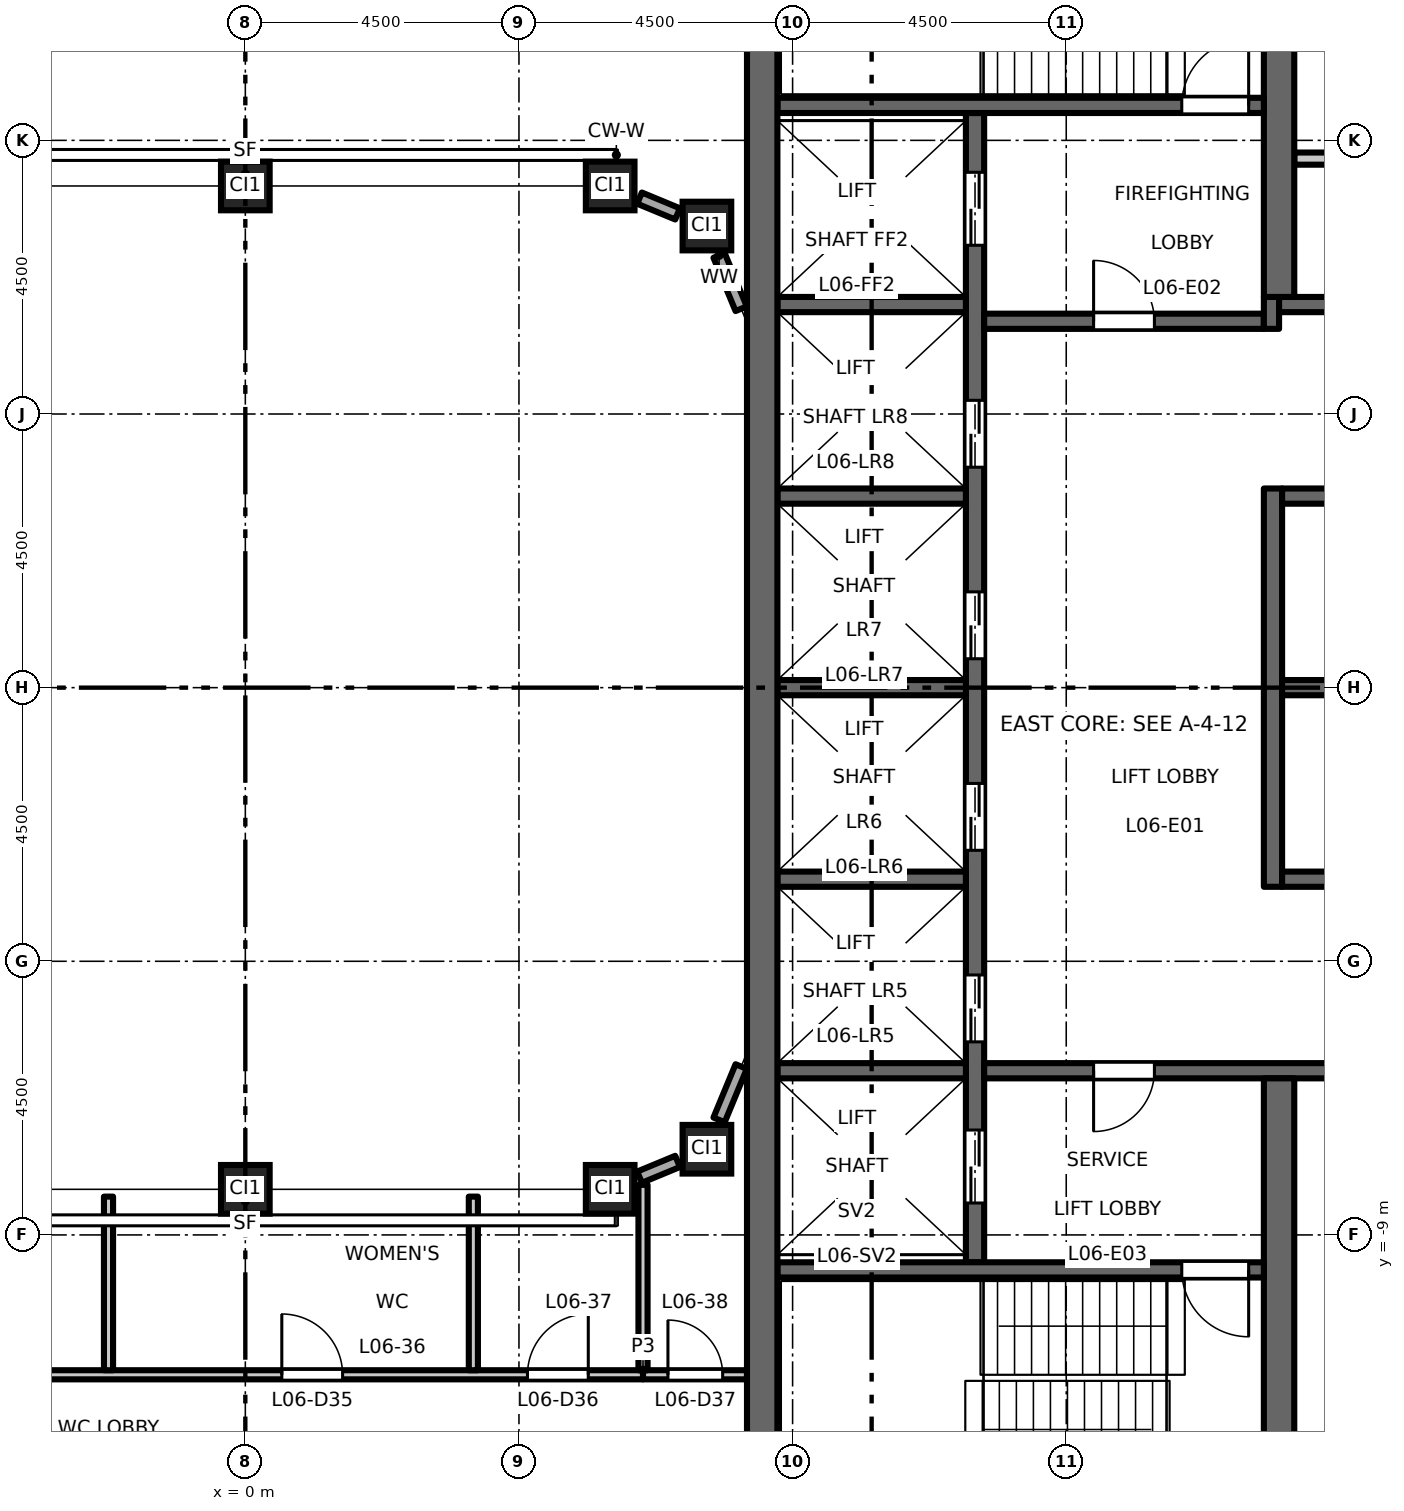
"""IFC4 building model, lengths in metres.
Left out: names, types, materials, properties, quantities, classifications, styles, units other than length and angle.
Written with IfcOpenShell. Run it as: python <this file> out.ifc"""

import sys

from ifc_helpers import new_model, si_unit, direction, frame, frame_2d, origin, origin_2d, place, context, subcontext, project, spatial, rectangle, hollow_rectangle, extrude, element, fill, save


model = new_model("IFC4")
c1 = context("Model", 3, precision=1e-05, world=origin(), true_north=direction((0.0, 1.0)))
c2 = subcontext(c1, "Body", "Model", "MODEL_VIEW")
j1 = project(units=[si_unit("LENGTHUNIT", "METRE"), si_unit("PLANEANGLEUNIT", "RADIAN")], contexts=[c1])
p1 = place(None, origin())
s1 = spatial("IfcSite", under=j1, at=p1, CompositionType="ELEMENT")
p2 = place(p1, origin())
s2 = spatial("IfcBuilding", under=s1, at=p2, CompositionType="ELEMENT")
p3 = place(p2, frame((0.0, 0.0, 31.2)))
s3 = spatial("IfcBuildingStorey", under=s2, at=p3, CompositionType="ELEMENT", Elevation=31.2)
for number, where, z_axis, x_axis in (
    (1, (0.0, -8.25, 0.0), (0.0, 0.0, 1.0), (1.0, 0.0, 0.0)),
    (2, (6.0, -8.25, 0.0), (0.0, 0.0, 1.0), (1.0, 0.0, 0.0)),
    (3, (7.591, -7.591, 0.0), (0.0, 0.0, 1.0), (1.0, 0.0, 0.0)),
    (4, (0.0, 8.25, 0.0), (0.0, 0.0, 1.0), (1.0, 0.0, 0.0)),
    (5, (6.0, 8.25, 0.0), (0.0, 0.0, 1.0), (1.0, 0.0, 0.0)),
    (6, (7.591, 7.591, 0.0), (0.0, 0.0, 1.0), (1.0, 0.0, 0.0)),
):
    element("IfcColumn", number, at=place(p3, frame(where, z_axis=z_axis, x_axis=x_axis)), inside=s3, PredefinedType="COLUMN", context=c2, shape_type="SweptSolid", body=[
        extrude(hollow_rectangle(XDim=0.8, YDim=0.8, WallThickness=0.05, at=origin_2d()), origin(), (0.0, 0.0, 1.0), 4.5),
    ])
p4 = place(p3, frame((12.0, -9.45, 0.0), z_axis=(0.0, 0.0, 1.0), x_axis=(0.0, 1.0, 0.0)))
e7 = element("IfcWall", 7, at=p4, inside=s3, PredefinedType="SHEAR", context=c2, shape_type="SweptSolid", body=[
    extrude(rectangle(XDim=18.9, YDim=0.3, at=frame_2d((9.45, 0.0))), origin(), (0.0, 0.0, 1.0), 4.35),
])
p5 = place(p4, frame((3.625, 0.0, 0.0)))
e8 = element("IfcOpeningElement", 8, at=p5, cuts=e7, PredefinedType="OPENING", context=c2, shape_type="SweptSolid", body=[
    extrude(rectangle(XDim=1.1, YDim=2.1, at=frame_2d((0.55, 1.05))), frame((0.0, 0.16, 0.0), z_axis=(0.0, -1.0, 0.0), x_axis=(1.0, 0.0, 0.0)), (0.0, 0.0, 1.0), 0.32),
])
p6 = place(p4, frame((6.775, 0.0, 0.0)))
e9 = element("IfcOpeningElement", 9, at=p6, cuts=e7, PredefinedType="OPENING", context=c2, shape_type="SweptSolid", body=[
    extrude(rectangle(XDim=1.1, YDim=2.1, at=frame_2d((0.55, 1.05))), frame((0.0, 0.16, 0.0), z_axis=(0.0, -1.0, 0.0), x_axis=(1.0, 0.0, 0.0)), (0.0, 0.0, 1.0), 0.32),
])
p7 = place(p4, frame((9.925, 0.0, 0.0)))
e10 = element("IfcOpeningElement", 10, at=p7, cuts=e7, PredefinedType="OPENING", context=c2, shape_type="SweptSolid", body=[
    extrude(rectangle(XDim=1.1, YDim=2.1, at=frame_2d((0.55, 1.05))), frame((0.0, 0.16, 0.0), z_axis=(0.0, -1.0, 0.0), x_axis=(1.0, 0.0, 0.0)), (0.0, 0.0, 1.0), 0.32),
])
p8 = place(p4, frame((13.075, 0.0, 0.0)))
e11 = element("IfcOpeningElement", 11, at=p8, cuts=e7, PredefinedType="OPENING", context=c2, shape_type="SweptSolid", body=[
    extrude(rectangle(XDim=1.1, YDim=2.1, at=frame_2d((0.55, 1.05))), frame((0.0, 0.16, 0.0), z_axis=(0.0, -1.0, 0.0), x_axis=(1.0, 0.0, 0.0)), (0.0, 0.0, 1.0), 0.32),
])
p9 = place(p4, frame((16.725, 0.0, 0.0)))
e12 = element("IfcOpeningElement", 12, at=p9, cuts=e7, PredefinedType="OPENING", context=c2, shape_type="SweptSolid", body=[
    extrude(rectangle(XDim=1.2, YDim=2.1, at=frame_2d((0.6, 1.05))), frame((0.0, 0.16, 0.0), z_axis=(0.0, -1.0, 0.0), x_axis=(1.0, 0.0, 0.0)), (0.0, 0.0, 1.0), 0.32),
])
p10 = place(p4, frame((0.975, 0.0, 0.0)))
e13 = element("IfcOpeningElement", 13, at=p10, cuts=e7, PredefinedType="OPENING", context=c2, shape_type="SweptSolid", body=[
    extrude(rectangle(XDim=1.2, YDim=2.1, at=frame_2d((0.6, 1.05))), frame((0.0, 0.16, 0.0), z_axis=(0.0, -1.0, 0.0), x_axis=(1.0, 0.0, 0.0)), (0.0, 0.0, 1.0), 0.32),
])
p11 = place(p3, frame((12.15, 6.025, 0.0), z_axis=(0.0, 0.0, 1.0), x_axis=(1.0, 0.0, 0.0)))
e14 = element("IfcWall", 14, at=p11, inside=s3, PredefinedType="SHEAR", context=c2, shape_type="SweptSolid", body=[
    extrude(rectangle(XDim=4.6, YDim=0.25, at=frame_2d((2.3, 0.0))), origin(), (0.0, 0.0, 1.0), 4.35),
])
p12 = place(p11, frame((1.8, 0.0, 0.0)))
e15 = element("IfcOpeningElement", 15, at=p12, cuts=e14, PredefinedType="OPENING", context=c2, shape_type="SweptSolid", body=[
    extrude(rectangle(XDim=1.0, YDim=2.1, at=frame_2d((0.5, 1.05))), frame((0.0, 0.135, 0.0), z_axis=(0.0, -1.0, 0.0), x_axis=(1.0, 0.0, 0.0)), (0.0, 0.0, 1.0), 0.27),
])
p13 = place(p3, frame((16.875, 5.9, 0.0), z_axis=(0.0, 0.0, 1.0), x_axis=(0.0, 1.0, 0.0)))
e16 = element("IfcWall", 16, at=p13, inside=s3, PredefinedType="SHEAR", context=c2, shape_type="SweptSolid", body=[
    extrude(rectangle(XDim=0.525, YDim=0.25, at=frame_2d((0.263, 0.0))), origin(), (0.0, 0.0, 1.0), 4.35),
])
p14 = place(p3, frame((17.0, 6.3, 0.0), z_axis=(0.0, 0.0, 1.0), x_axis=(1.0, 0.0, 0.0)))
e17 = element("IfcWall", 17, at=p14, inside=s3, PredefinedType="SHEAR", context=c2, shape_type="SweptSolid", body=[
    extrude(rectangle(XDim=4.25, YDim=0.25, at=frame_2d((2.125, 0.0))), origin(), (0.0, 0.0, 1.0), 4.35),
])
p15 = place(p14, frame((1.3, 0.0, 0.0)))
e18 = element("IfcOpeningElement", 18, at=p15, cuts=e17, PredefinedType="OPENING", context=c2, shape_type="SweptSolid", body=[
    extrude(rectangle(XDim=0.9, YDim=2.1, at=frame_2d((0.45, 1.05))), frame((0.0, 0.135, 0.0), z_axis=(0.0, -1.0, 0.0), x_axis=(1.0, 0.0, 0.0)), (0.0, 0.0, 1.0), 0.27),
])
p16 = place(p3, frame((12.15, -6.3, 0.0), z_axis=(0.0, 0.0, 1.0), x_axis=(1.0, 0.0, 0.0)))
e19 = element("IfcWall", 19, at=p16, inside=s3, PredefinedType="SHEAR", context=c2, shape_type="SweptSolid", body=[
    extrude(rectangle(XDim=9.1, YDim=0.25, at=frame_2d((4.55, 0.0))), origin(), (0.0, 0.0, 1.0), 4.35),
])
p17 = place(p16, frame((1.8, 0.0, 0.0)))
e20 = element("IfcOpeningElement", 20, at=p17, cuts=e19, PredefinedType="OPENING", context=c2, shape_type="SweptSolid", body=[
    extrude(rectangle(XDim=1.0, YDim=2.1, at=frame_2d((0.5, 1.05))), frame((0.0, 0.135, 0.0), z_axis=(0.0, -1.0, 0.0), x_axis=(1.0, 0.0, 0.0)), (0.0, 0.0, 1.0), 0.27),
])
p18 = place(p16, frame((6.65, 0.0, 0.0)))
e21 = element("IfcOpeningElement", 21, at=p18, cuts=e19, PredefinedType="OPENING", context=c2, shape_type="SweptSolid", body=[
    extrude(rectangle(XDim=0.9, YDim=2.1, at=frame_2d((0.45, 1.05))), frame((0.0, 0.135, 0.0), z_axis=(0.0, -1.0, 0.0), x_axis=(1.0, 0.0, 0.0)), (0.0, 0.0, 1.0), 0.27),
])
p19 = place(p3, frame((17.25, 8.7, 0.0), z_axis=(0.0, 0.0, 1.0), x_axis=(1.0, 0.0, 0.0)))
e22 = element("IfcWall", 22, at=p19, inside=s3, PredefinedType="PARTITIONING", context=c2, shape_type="SweptSolid", body=[
    extrude(rectangle(XDim=4.0, YDim=0.2, at=frame_2d((2.0, 0.0))), origin(), (0.0, 0.0, 1.0), 4.35),
])
p20 = place(p3, frame((16.9, -3.275, 0.0), z_axis=(0.0, 0.0, 1.0), x_axis=(0.0, 1.0, 0.0)))
e23 = element("IfcWall", 23, at=p20, inside=s3, PredefinedType="SHEAR", context=c2, shape_type="SweptSolid", body=[
    extrude(rectangle(XDim=6.55, YDim=0.3, at=frame_2d((3.275, 0.0))), origin(), (0.0, 0.0, 1.0), 4.35),
])
for number, where, z_axis, x_axis in (
    (24, (17.05, 0.0, 0.0), (0.0, 0.0, 1.0), (1.0, 0.0, 0.0)),
    (25, (17.05, 3.15, 0.0), (0.0, 0.0, 1.0), (1.0, 0.0, 0.0)),
    (26, (17.05, -3.15, 0.0), (0.0, 0.0, 1.0), (1.0, 0.0, 0.0)),
):
    element("IfcWall", number, at=place(p3, frame(where, z_axis=z_axis, x_axis=x_axis)), inside=s3, PredefinedType="SHEAR", context=c2, shape_type="SweptSolid", body=[
        extrude(rectangle(XDim=4.2, YDim=0.25, at=frame_2d((2.1, 0.0))), origin(), (0.0, 0.0, 1.0), 4.35),
    ])
for number, where, z_axis, x_axis in (
    (27, (17.0, 6.425, 0.0), (0.0, 0.0, 1.0), (0.0, 1.0, 0.0)),
    (28, (17.0, -13.0, 0.0), (0.0, 0.0, 1.0), (0.0, 1.0, 0.0)),
):
    element("IfcWall", number, at=place(p3, frame(where, z_axis=z_axis, x_axis=x_axis)), inside=s3, PredefinedType="SHEAR", context=c2, shape_type="SweptSolid", body=[
        extrude(rectangle(XDim=6.575, YDim=0.5, at=frame_2d((3.288, 0.0))), origin(), (0.0, 0.0, 1.0), 4.35),
    ])
for number, where, z_axis, x_axis in (
    (29, (8.75, 0.0, 0.0), (0.0, 0.0, 1.0), (1.0, 0.0, 0.0)),
    (30, (8.75, 3.15, 0.0), (0.0, 0.0, 1.0), (1.0, 0.0, 0.0)),
    (31, (8.75, 6.3, 0.0), (0.0, 0.0, 1.0), (1.0, 0.0, 0.0)),
    (32, (8.75, -3.15, 0.0), (0.0, 0.0, 1.0), (1.0, 0.0, 0.0)),
    (33, (8.75, -6.3, 0.0), (0.0, 0.0, 1.0), (1.0, 0.0, 0.0)),
):
    element("IfcWall", number, at=place(p3, frame(where, z_axis=z_axis, x_axis=x_axis)), inside=s3, PredefinedType="SHEAR", context=c2, shape_type="SweptSolid", body=[
        extrude(rectangle(XDim=3.1, YDim=0.25, at=frame_2d((1.55, 0.0))), origin(), (0.0, 0.0, 1.0), 4.35),
    ])
p21 = place(p3, frame((8.75, 9.575, 0.0), z_axis=(0.0, 0.0, 1.0), x_axis=(1.0, 0.0, 0.0)))
e34 = element("IfcWall", 34, at=p21, inside=s3, PredefinedType="SHEAR", context=c2, shape_type="SweptSolid", body=[
    extrude(rectangle(XDim=8.0, YDim=0.25, at=frame_2d((4.0, 0.0))), origin(), (0.0, 0.0, 1.0), 4.35),
])
p22 = place(p21, frame((6.65, 0.0, 0.0)))
e35 = element("IfcOpeningElement", 35, at=p22, cuts=e34, PredefinedType="OPENING", context=c2, shape_type="SweptSolid", body=[
    extrude(rectangle(XDim=1.1, YDim=2.1, at=frame_2d((0.55, 1.05))), frame((0.0, 0.135, 0.0), z_axis=(0.0, -1.0, 0.0), x_axis=(1.0, 0.0, 0.0)), (0.0, 0.0, 1.0), 0.27),
])
p23 = place(p3, frame((8.75, -9.575, 0.0), z_axis=(0.0, 0.0, 1.0), x_axis=(1.0, 0.0, 0.0)))
e36 = element("IfcWall", 36, at=p23, inside=s3, PredefinedType="SHEAR", context=c2, shape_type="SweptSolid", body=[
    extrude(rectangle(XDim=8.0, YDim=0.25, at=frame_2d((4.0, 0.0))), origin(), (0.0, 0.0, 1.0), 4.35),
])
p24 = place(p23, frame((6.65, 0.0, 0.0)))
e37 = element("IfcOpeningElement", 37, at=p24, cuts=e36, PredefinedType="OPENING", context=c2, shape_type="SweptSolid", body=[
    extrude(rectangle(XDim=1.1, YDim=2.1, at=frame_2d((0.55, 1.05))), frame((0.0, 0.135, 0.0), z_axis=(0.0, -1.0, 0.0), x_axis=(1.0, 0.0, 0.0)), (0.0, 0.0, 1.0), 0.27),
])
p25 = place(p3, frame((8.5, -13.0, 0.0), z_axis=(0.0, 0.0, 1.0), x_axis=(0.0, 1.0, 0.0)))
e38 = element("IfcWall", 38, at=p25, inside=s3, PredefinedType="SHEAR", context=c2, shape_type="SweptSolid", body=[
    extrude(rectangle(XDim=26.0, YDim=0.5, at=frame_2d((13.0, 0.0))), origin(), (0.0, 0.0, 1.0), 4.35),
])
p26 = place(p3, frame((6.483, -8.05, 0.0), z_axis=(0.0, 0.0, 1.0), x_axis=(0.923854141361, 0.382744726273, 0.0)))
e39 = element("IfcWall", 39, at=p26, inside=s3, PredefinedType="STANDARD", context=c2, shape_type="SweptSolid", body=[
    extrude(rectangle(XDim=0.677, YDim=0.2, at=frame_2d((0.338, 0.0))), origin(), (0.0, 0.0, 1.0), 3.73),
])
for number, where, z_axis, x_axis in (
    (40, (7.791, -7.108, 0.0), (0.0, 0.0, 1.0), (0.383, 0.924, 0.0)),
    (41, (8.154, 6.231, 0.0), (0.0, 0.0, 1.0), (-0.383, 0.924, 0.0)),
):
    element("IfcWall", number, at=place(p3, frame(where, z_axis=z_axis, x_axis=x_axis)), inside=s3, PredefinedType="STANDARD", context=c2, shape_type="SweptSolid", body=[
        extrude(rectangle(XDim=0.949, YDim=0.2, at=frame_2d((0.475, 0.0))), origin(), (0.0, 0.0, 1.0), 3.73),
    ])
p27 = place(p3, frame((7.108, 7.791, 0.0), z_axis=(0.0, 0.0, 1.0), x_axis=(-0.923854141361, 0.382744726273, 0.0)))
e42 = element("IfcWall", 42, at=p27, inside=s3, PredefinedType="STANDARD", context=c2, shape_type="SweptSolid", body=[
    extrude(rectangle(XDim=0.677, YDim=0.2, at=frame_2d((0.338, 0.0))), origin(), (0.0, 0.0, 1.0), 3.73),
])
p28 = place(p3, frame((-8.25, -11.3, 0.0), z_axis=(0.0, 0.0, 1.0), x_axis=(1.0, 0.0, 0.0)))
e43 = element("IfcWall", 43, at=p28, inside=s3, PredefinedType="PARTITIONING", context=c2, shape_type="SweptSolid", body=[
    extrude(rectangle(XDim=14.79, YDim=0.15, at=frame_2d((7.395, 0.0))), origin(), (0.0, 0.0, 1.0), 4.35),
])
p29 = place(p28, frame((2.6, 0.0, 0.0)))
e44 = element("IfcOpeningElement", 44, at=p29, cuts=e43, PredefinedType="OPENING", context=c2, shape_type="SweptSolid", body=[
    extrude(rectangle(XDim=1.0, YDim=2.1, at=frame_2d((0.5, 1.05))), frame((0.0, 0.085, 0.0), z_axis=(0.0, -1.0, 0.0), x_axis=(1.0, 0.0, 0.0)), (0.0, 0.0, 1.0), 0.17),
])
p30 = place(p28, frame((8.85, 0.0, 0.0)))
e45 = element("IfcOpeningElement", 45, at=p30, cuts=e43, PredefinedType="OPENING", context=c2, shape_type="SweptSolid", body=[
    extrude(rectangle(XDim=1.0, YDim=2.1, at=frame_2d((0.5, 1.05))), frame((0.0, 0.085, 0.0), z_axis=(0.0, -1.0, 0.0), x_axis=(1.0, 0.0, 0.0)), (0.0, 0.0, 1.0), 0.17),
])
p31 = place(p28, frame((12.89, 0.0, 0.0)))
e46 = element("IfcOpeningElement", 46, at=p31, cuts=e43, PredefinedType="OPENING", context=c2, shape_type="SweptSolid", body=[
    extrude(rectangle(XDim=1.0, YDim=2.1, at=frame_2d((0.5, 1.05))), frame((0.0, 0.085, 0.0), z_axis=(0.0, -1.0, 0.0), x_axis=(1.0, 0.0, 0.0)), (0.0, 0.0, 1.0), 0.17),
])
p32 = place(p3, frame((6.54, -11.3, 0.0), z_axis=(0.0, 0.0, 1.0), x_axis=(1.0, 0.0, 0.0)))
e47 = element("IfcWall", 47, at=p32, inside=s3, PredefinedType="PARTITIONING", context=c2, shape_type="SweptSolid", body=[
    extrude(rectangle(XDim=1.71, YDim=0.15, at=frame_2d((0.855, 0.0))), origin(), (0.0, 0.0, 1.0), 4.35),
])
p33 = place(p32, frame((0.41, 0.0, 0.0)))
e48 = element("IfcOpeningElement", 48, at=p33, cuts=e47, PredefinedType="OPENING", context=c2, shape_type="SweptSolid", body=[
    extrude(rectangle(XDim=0.9, YDim=2.1, at=frame_2d((0.45, 1.05))), frame((0.0, 0.085, 0.0), z_axis=(0.0, -1.0, 0.0), x_axis=(1.0, 0.0, 0.0)), (0.0, 0.0, 1.0), 0.17),
])
for number, where, z_axis, x_axis in (
    (49, (-2.25, -11.225, 0.0), (0.0, 0.0, 1.0), (0.0, 1.0, 0.0)),
    (50, (3.75, -11.225, 0.0), (0.0, 0.0, 1.0), (0.0, 1.0, 0.0)),
):
    element("IfcWall", number, at=place(p3, frame(where, z_axis=z_axis, x_axis=x_axis)), inside=s3, PredefinedType="PARTITIONING", context=c2, shape_type="SweptSolid", body=[
        extrude(rectangle(XDim=2.855, YDim=0.15, at=frame_2d((1.427, 0.0))), origin(), (0.0, 0.0, 1.0), 4.35),
    ])
p34 = place(p3, frame((6.54, -11.225, 0.0), z_axis=(0.0, 0.0, 1.0), x_axis=(0.0, 1.0, 0.0)))
e51 = element("IfcWall", 51, at=p34, inside=s3, PredefinedType="PARTITIONING", context=c2, shape_type="SweptSolid", body=[
    extrude(rectangle(XDim=3.049, YDim=0.15, at=frame_2d((1.524, 0.0))), origin(), (0.0, 0.0, 1.0), 4.35),
])
p35 = place(p12, origin())
e52 = element("IfcDoor", 52, at=p35, inside=s3, OperationType="SINGLE_SWING_RIGHT", PredefinedType="DOOR", context=c2, shape_type="SweptSolid", body=[
    extrude(rectangle(XDim=1.0, YDim=2.1, at=frame_2d((0.5, 1.05))), frame((0.0, 0.025, 0.0), z_axis=(0.0, -1.0, 0.0), x_axis=(1.0, 0.0, 0.0)), (0.0, 0.0, 1.0), 0.05),
])
fill(e15, e52)
p36 = place(p17, origin())
e53 = element("IfcDoor", 53, at=p36, inside=s3, OperationType="SINGLE_SWING_LEFT", PredefinedType="DOOR", context=c2, shape_type="SweptSolid", body=[
    extrude(rectangle(XDim=1.0, YDim=2.1, at=frame_2d((0.5, 1.05))), frame((0.0, 0.025, 0.0), z_axis=(0.0, -1.0, 0.0), x_axis=(1.0, 0.0, 0.0)), (0.0, 0.0, 1.0), 0.05),
])
fill(e20, e53)
p37 = place(p22, origin())
e54 = element("IfcDoor", 54, at=p37, inside=s3, OperationType="SINGLE_SWING_LEFT", PredefinedType="DOOR", context=c2, shape_type="SweptSolid", body=[
    extrude(rectangle(XDim=1.1, YDim=2.1, at=frame_2d((0.55, 1.05))), frame((0.0, 0.025, 0.0), z_axis=(0.0, -1.0, 0.0), x_axis=(1.0, 0.0, 0.0)), (0.0, 0.0, 1.0), 0.05),
])
fill(e35, e54)
p38 = place(p24, origin())
e55 = element("IfcDoor", 55, at=p38, inside=s3, OperationType="SINGLE_SWING_RIGHT", PredefinedType="DOOR", context=c2, shape_type="SweptSolid", body=[
    extrude(rectangle(XDim=1.1, YDim=2.1, at=frame_2d((0.55, 1.05))), frame((0.0, 0.025, 0.0), z_axis=(0.0, -1.0, 0.0), x_axis=(1.0, 0.0, 0.0)), (0.0, 0.0, 1.0), 0.05),
])
fill(e37, e55)
p39 = place(p5, origin())
e56 = element("IfcDoor", 56, at=p39, inside=s3, OperationType="DOUBLE_DOOR_SLIDING", PredefinedType="DOOR", context=c2, shape_type="SweptSolid", body=[
    extrude(rectangle(XDim=1.1, YDim=2.1, at=frame_2d((0.55, 1.05))), frame((0.0, 0.025, 0.0), z_axis=(0.0, -1.0, 0.0), x_axis=(1.0, 0.0, 0.0)), (0.0, 0.0, 1.0), 0.05),
])
fill(e8, e56)
p40 = place(p6, origin())
e57 = element("IfcDoor", 57, at=p40, inside=s3, OperationType="DOUBLE_DOOR_SLIDING", PredefinedType="DOOR", context=c2, shape_type="SweptSolid", body=[
    extrude(rectangle(XDim=1.1, YDim=2.1, at=frame_2d((0.55, 1.05))), frame((0.0, 0.025, 0.0), z_axis=(0.0, -1.0, 0.0), x_axis=(1.0, 0.0, 0.0)), (0.0, 0.0, 1.0), 0.05),
])
fill(e9, e57)
p41 = place(p7, origin())
e58 = element("IfcDoor", 58, at=p41, inside=s3, OperationType="DOUBLE_DOOR_SLIDING", PredefinedType="DOOR", context=c2, shape_type="SweptSolid", body=[
    extrude(rectangle(XDim=1.1, YDim=2.1, at=frame_2d((0.55, 1.05))), frame((0.0, 0.025, 0.0), z_axis=(0.0, -1.0, 0.0), x_axis=(1.0, 0.0, 0.0)), (0.0, 0.0, 1.0), 0.05),
])
fill(e10, e58)
p42 = place(p8, origin())
e59 = element("IfcDoor", 59, at=p42, inside=s3, OperationType="DOUBLE_DOOR_SLIDING", PredefinedType="DOOR", context=c2, shape_type="SweptSolid", body=[
    extrude(rectangle(XDim=1.1, YDim=2.1, at=frame_2d((0.55, 1.05))), frame((0.0, 0.025, 0.0), z_axis=(0.0, -1.0, 0.0), x_axis=(1.0, 0.0, 0.0)), (0.0, 0.0, 1.0), 0.05),
])
fill(e11, e59)
p43 = place(p9, origin())
e60 = element("IfcDoor", 60, at=p43, inside=s3, OperationType="DOUBLE_DOOR_SLIDING", PredefinedType="DOOR", context=c2, shape_type="SweptSolid", body=[
    extrude(rectangle(XDim=1.2, YDim=2.1, at=frame_2d((0.6, 1.05))), frame((0.0, 0.025, 0.0), z_axis=(0.0, -1.0, 0.0), x_axis=(1.0, 0.0, 0.0)), (0.0, 0.0, 1.0), 0.05),
])
fill(e12, e60)
p44 = place(p10, origin())
e61 = element("IfcDoor", 61, at=p44, inside=s3, OperationType="DOUBLE_DOOR_SLIDING", PredefinedType="DOOR", context=c2, shape_type="SweptSolid", body=[
    extrude(rectangle(XDim=1.2, YDim=2.1, at=frame_2d((0.6, 1.05))), frame((0.0, 0.025, 0.0), z_axis=(0.0, -1.0, 0.0), x_axis=(1.0, 0.0, 0.0)), (0.0, 0.0, 1.0), 0.05),
])
fill(e13, e61)
p45 = place(p30, origin())
e62 = element("IfcDoor", 62, at=p45, inside=s3, OperationType="SINGLE_SWING_LEFT", PredefinedType="DOOR", context=c2, shape_type="SweptSolid", body=[
    extrude(rectangle(XDim=1.0, YDim=2.1, at=frame_2d((0.5, 1.05))), frame((0.0, 0.025, 0.0), z_axis=(0.0, -1.0, 0.0), x_axis=(1.0, 0.0, 0.0)), (0.0, 0.0, 1.0), 0.05),
])
fill(e45, e62)
p46 = place(p31, origin())
e63 = element("IfcDoor", 63, at=p46, inside=s3, OperationType="SINGLE_SWING_RIGHT", PredefinedType="DOOR", context=c2, shape_type="SweptSolid", body=[
    extrude(rectangle(XDim=1.0, YDim=2.1, at=frame_2d((0.5, 1.05))), frame((0.0, 0.025, 0.0), z_axis=(0.0, -1.0, 0.0), x_axis=(1.0, 0.0, 0.0)), (0.0, 0.0, 1.0), 0.05),
])
fill(e46, e63)
p47 = place(p33, origin())
e64 = element("IfcDoor", 64, at=p47, inside=s3, OperationType="SINGLE_SWING_LEFT", PredefinedType="DOOR", context=c2, shape_type="SweptSolid", body=[
    extrude(rectangle(XDim=0.9, YDim=2.1, at=frame_2d((0.45, 1.05))), frame((0.0, 0.025, 0.0), z_axis=(0.0, -1.0, 0.0), x_axis=(1.0, 0.0, 0.0)), (0.0, 0.0, 1.0), 0.05),
])
fill(e48, e64)
save(model, sys.argv[1])
